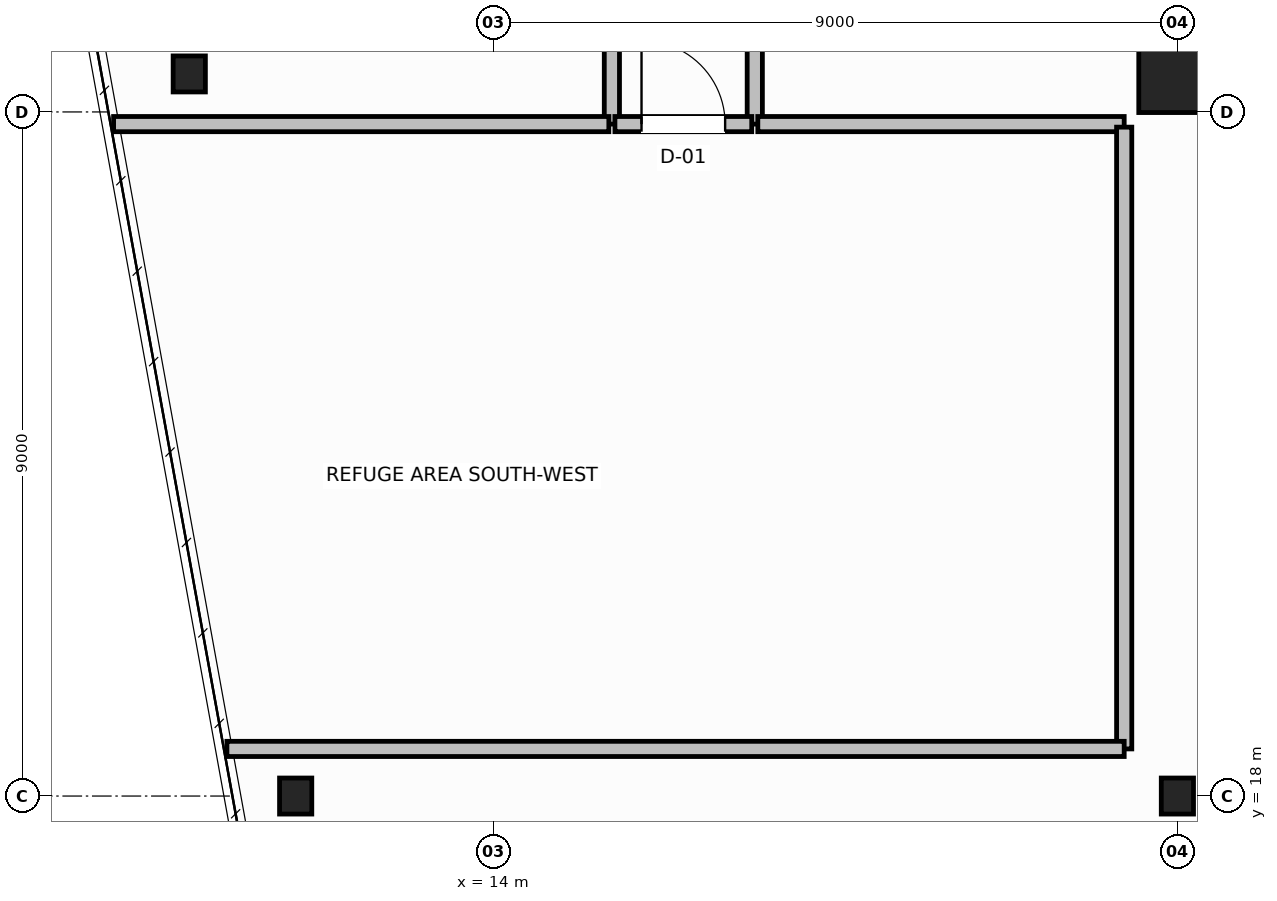
"""IFC4 building model, lengths in metres.
Left out: names, types, materials, properties, quantities, classifications, styles, units other than length and angle.
Written with IfcOpenShell. Run it as: python <this file> out.ifc"""

import sys

from ifc_helpers import new_model, si_unit, direction, frame, frame_2d, origin, origin_2d, place, context, subcontext, project, spatial, rectangle, hollow_circle, i_section, extrude, source, transform, mapped, element, fill, save


model = new_model("IFC4")
c1 = context("Model", 3, precision=1e-05, world=origin(), true_north=direction((0.0, 1.0)))
c2 = subcontext(c1, "Body", "Model", "MODEL_VIEW")
j1 = project(units=[si_unit("LENGTHUNIT", "METRE"), si_unit("PLANEANGLEUNIT", "RADIAN")], contexts=[c1])
p1 = place(None, origin())
s1 = spatial("IfcSite", under=j1, at=p1, CompositionType="ELEMENT")
p2 = place(p1, origin())
s2 = spatial("IfcBuilding", under=s1, at=p2, CompositionType="ELEMENT")
p3 = place(p2, frame((0.0, 0.0, 149.0)))
s3 = spatial("IfcBuildingStorey", under=s2, at=p3, CompositionType="ELEMENT", Elevation=149.0)
m1 = source(origin(), c2, "Body", "SweptSolid", [
    extrude(i_section(OverallWidth=0.424, OverallDepth=0.474, WebThickness=0.047, FlangeThickness=0.065, FilletRadius=0.015, at=origin_2d()), origin(), (0.0, 0.0, 1.0), 4.8),
])
for number, where, z_axis, x_axis in (
    (1, (10.0, 27.5, 0.0), (0.0, 0.0, 1.0), (1.0, 0.0, 0.0)),
    (2, (11.4, 18.0, 0.0), (0.0, 0.0, 1.0), (1.0, 0.0, 0.0)),
):
    element("IfcColumn", number, at=place(p3, frame(where, z_axis=z_axis, x_axis=x_axis)), inside=s3, PredefinedType="COLUMN", context=c2, shape_type="MappedRepresentation", body=[
        mapped(m1, transform((0.0, 0.0, 0.0), scale=1.0)),
    ])
m2 = source(origin(), c2, "Body", "SweptSolid", [
    extrude(hollow_circle(Radius=0.508, WallThickness=0.045, at=origin_2d()), origin(), (0.0, 0.0, 1.0), 4.8),
])
p4 = place(p3, frame((23.0, 27.5, 0.0), z_axis=(0.0, 0.0, 1.0), x_axis=(1.0, 0.0, 0.0)))
e3 = element("IfcColumn", 3, at=p4, inside=s3, PredefinedType="COLUMN", context=c2, shape_type="MappedRepresentation", body=[
    mapped(m2, transform((0.0, 0.0, 0.0), scale=1.0)),
])
m3 = source(origin(), c2, "Body", "SweptSolid", [
    extrude(i_section(OverallWidth=0.424, OverallDepth=0.474, WebThickness=0.047, FlangeThickness=0.065, FilletRadius=0.015, at=origin_2d()), origin(), (0.0, 0.0, 1.0), 4.8),
])
p5 = place(p3, frame((23.0, 18.0, 0.0), z_axis=(0.0, 0.0, 1.0), x_axis=(1.0, 0.0, 0.0)))
e4 = element("IfcColumn", 4, at=p5, inside=s3, PredefinedType="COLUMN", context=c2, shape_type="MappedRepresentation", body=[
    mapped(m3, transform((0.0, 0.0, 0.0), scale=1.0)),
])
p6 = place(p3, frame((15.56, 26.84, 0.0), z_axis=(0.0, 0.0, 1.0), x_axis=(0.0, 1.0, 0.0)))
e5 = element("IfcWall", 5, at=p6, inside=s3, PredefinedType="SOLIDWALL", context=c2, shape_type="SweptSolid", body=[
    extrude(rectangle(XDim=6.92, YDim=0.2, at=frame_2d((3.46, 0.0))), origin(), (0.0, 0.0, 1.0), 4.54),
])
p7 = place(p3, frame((17.44, 26.84, 0.0), z_axis=(0.0, 0.0, 1.0), x_axis=(0.0, 1.0, 0.0)))
e6 = element("IfcWall", 6, at=p7, inside=s3, PredefinedType="SOLIDWALL", context=c2, shape_type="SweptSolid", body=[
    extrude(rectangle(XDim=6.92, YDim=0.2, at=frame_2d((3.46, 0.0))), origin(), (0.0, 0.0, 1.0), 4.54),
])
p8 = place(p7, frame((3.0, 0.0, 0.0)))
e7 = element("IfcOpeningElement", 7, at=p8, cuts=e6, PredefinedType="OPENING", context=c2, shape_type="SweptSolid", body=[
    extrude(rectangle(XDim=1.1, YDim=2.15, at=frame_2d((0.55, 1.075))), frame((0.0, 0.11, 0.0), z_axis=(0.0, -1.0, 0.0), x_axis=(1.0, 0.0, 0.0)), (0.0, 0.0, 1.0), 0.22),
])
p9 = place(p3, frame((15.6, 26.84, 0.0), z_axis=(0.0, 0.0, 1.0), x_axis=(1.0, 0.0, 0.0)))
e8 = element("IfcWall", 8, at=p9, inside=s3, PredefinedType="SOLIDWALL", context=c2, shape_type="SweptSolid", body=[
    extrude(rectangle(XDim=1.8, YDim=0.2, at=frame_2d((0.9, 0.0))), origin(), (0.0, 0.0, 1.0), 4.54),
])
p10 = place(p9, frame((0.35, 0.0, 0.0)))
e9 = element("IfcOpeningElement", 9, at=p10, cuts=e8, PredefinedType="OPENING", context=c2, shape_type="SweptSolid", body=[
    extrude(rectangle(XDim=1.1, YDim=2.15, at=frame_2d((0.55, 1.075))), frame((0.0, 0.11, 0.0), z_axis=(0.0, -1.0, 0.0), x_axis=(1.0, 0.0, 0.0)), (0.0, 0.0, 1.0), 0.22),
])
p11 = place(p3, frame((9.004, 26.84, 0.0), z_axis=(0.0, 0.0, 1.0), x_axis=(1.0, 0.0, 0.0)))
e10 = element("IfcWall", 10, at=p11, inside=s3, PredefinedType="SOLIDWALL", context=c2, shape_type="SweptSolid", body=[
    extrude(rectangle(XDim=6.516, YDim=0.2, at=frame_2d((3.258, 0.0))), origin(), (0.0, 0.0, 1.0), 4.54),
])
p12 = place(p3, frame((17.48, 26.84, 0.0), z_axis=(0.0, 0.0, 1.0), x_axis=(1.0, 0.0, 0.0)))
e11 = element("IfcWall", 11, at=p12, inside=s3, PredefinedType="SOLIDWALL", context=c2, shape_type="SweptSolid", body=[
    extrude(rectangle(XDim=4.82, YDim=0.2, at=frame_2d((2.41, 0.0))), origin(), (0.0, 0.0, 1.0), 4.54),
])
p13 = place(p3, frame((22.3, 18.62, 0.0), z_axis=(0.0, 0.0, 1.0), x_axis=(0.0, 1.0, 0.0)))
e12 = element("IfcWall", 12, at=p13, inside=s3, PredefinedType="SOLIDWALL", context=c2, shape_type="SweptSolid", body=[
    extrude(rectangle(XDim=8.18, YDim=0.2, at=frame_2d((4.09, 0.0))), origin(), (0.0, 0.0, 1.0), 4.54),
])
p14 = place(p3, frame((10.495, 18.62, 0.0), z_axis=(0.0, 0.0, 1.0), x_axis=(1.0, 0.0, 0.0)))
e13 = element("IfcWall", 13, at=p14, inside=s3, PredefinedType="SOLIDWALL", context=c2, shape_type="SweptSolid", body=[
    extrude(rectangle(XDim=11.805, YDim=0.2, at=frame_2d((5.902, 0.0))), origin(), (0.0, 0.0, 1.0), 4.54),
])
m4 = source(origin(), c2, "Body", "SweptSolid", [
    extrude(rectangle(XDim=1.1, YDim=2.15, at=frame_2d((0.55, 1.075))), frame((0.0, 0.025, 0.0), z_axis=(0.0, -1.0, 0.0), x_axis=(1.0, 0.0, 0.0)), (0.0, 0.0, 1.0), 0.05),
])
p15 = place(p10, origin())
e14 = element("IfcDoor", 14, at=p15, inside=s3, OperationType="SINGLE_SWING_LEFT", PredefinedType="DOOR", context=c2, shape_type="MappedRepresentation", body=[
    mapped(m4, transform((0.0, 0.0, 0.0), scale=1.0)),
])
fill(e9, e14)
save(model, sys.argv[1])
